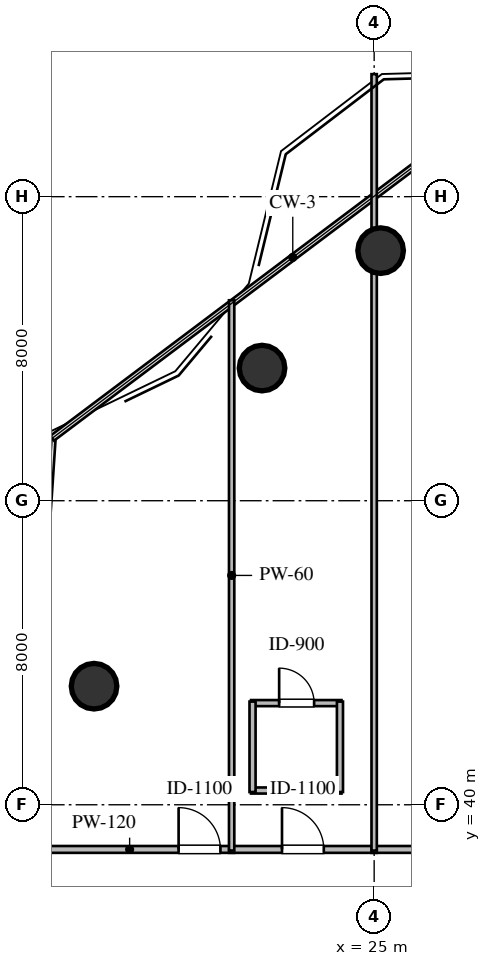
"""IFC4 building model, lengths in metres.
Left out: names, types, materials, properties, quantities, classifications, styles, units other than length and angle.
Written with IfcOpenShell. Run it as: python <this file> out.ifc"""

import sys

from ifc_helpers import new_model, si_unit, direction, frame, frame_2d, origin, origin_2d, place, context, subcontext, project, spatial, rectangle, circle, extrude, element, fill, save


model = new_model("IFC4")
c1 = context("Model", 3, precision=1e-05, world=origin(), true_north=direction((0.0, 1.0)))
c2 = subcontext(c1, "Body", "Model", "MODEL_VIEW")
j1 = project(units=[si_unit("LENGTHUNIT", "METRE"), si_unit("PLANEANGLEUNIT", "RADIAN")], contexts=[c1])
p1 = place(None, origin())
s1 = spatial("IfcSite", under=j1, at=p1, CompositionType="ELEMENT")
p2 = place(p1, origin())
s2 = spatial("IfcBuilding", under=s1, at=p2, CompositionType="ELEMENT")
p3 = place(p2, frame((0.0, 0.0, 124.2)))
s3 = spatial("IfcBuildingStorey", under=s2, at=p3, CompositionType="ELEMENT", Elevation=124.2)
for number, where, z_axis, x_axis in (
    (1, (25.17, 54.58, 0.0), (0.0, 0.0, 1.0), (1.0, 0.0, 0.0)),
    (2, (22.05, 51.49, 0.0), (0.0, 0.0, 1.0), (1.0, 0.0, 0.0)),
    (3, (17.63, 43.12, 0.0), (0.0, 0.0, 1.0), (1.0, 0.0, 0.0)),
):
    element("IfcColumn", number, at=place(p3, frame(where, z_axis=z_axis, x_axis=x_axis)), inside=s3, PredefinedType="COLUMN", context=c2, shape_type="SweptSolid", body=[
        extrude(circle(Radius=0.6, at=origin_2d()), origin(), (0.0, 0.0, 1.0), 3.6),
    ])
p4 = place(p3, frame((21.76, 40.375, 0.0), z_axis=(0.0, 0.0, 1.0), x_axis=(1.0, 0.0, 0.0)))
e4 = element("IfcWall", 4, at=p4, inside=s3, PredefinedType="PLUMBINGWALL", context=c2, shape_type="SweptSolid", body=[
    extrude(rectangle(XDim=2.38, YDim=0.16, at=frame_2d((1.19, 0.0))), origin(), (0.0, 0.0, 1.0), 3.36),
])
p5 = place(p3, frame((21.76, 42.675, 0.0), z_axis=(0.0, 0.0, 1.0), x_axis=(1.0, 0.0, 0.0)))
e5 = element("IfcWall", 5, at=p5, inside=s3, PredefinedType="PLUMBINGWALL", context=c2, shape_type="SweptSolid", body=[
    extrude(rectangle(XDim=2.38, YDim=0.16, at=frame_2d((1.19, 0.0))), origin(), (0.0, 0.0, 1.0), 3.36),
])
p6 = place(p5, frame((0.74, 0.0, 0.0)))
e6 = element("IfcOpeningElement", 6, at=p6, cuts=e5, PredefinedType="OPENING", context=c2, shape_type="SweptSolid", body=[
    extrude(rectangle(XDim=0.92, YDim=2.1, at=frame_2d((0.46, 1.05))), frame((0.0, 0.09, 0.0), z_axis=(0.0, -1.0, 0.0), x_axis=(1.0, 0.0, 0.0)), (0.0, 0.0, 1.0), 0.18),
])
p7 = place(p3, frame((21.8, 40.335, 0.0), z_axis=(0.0, 0.0, 1.0), x_axis=(0.0, 1.0, 0.0)))
e7 = element("IfcWall", 7, at=p7, inside=s3, PredefinedType="PLUMBINGWALL", context=c2, shape_type="SweptSolid", body=[
    extrude(rectangle(XDim=2.38, YDim=0.16, at=frame_2d((1.19, 0.0))), origin(), (0.0, 0.0, 1.0), 2.806),
])
p8 = place(p3, frame((24.1, 40.335, 0.0), z_axis=(0.0, 0.0, 1.0), x_axis=(0.0, 1.0, 0.0)))
e8 = element("IfcWall", 8, at=p8, inside=s3, PredefinedType="PLUMBINGWALL", context=c2, shape_type="SweptSolid", body=[
    extrude(rectangle(XDim=2.38, YDim=0.16, at=frame_2d((1.19, 0.0))), origin(), (0.0, 0.0, 1.0), 3.36),
])
p9 = place(p3, frame((15.817, 38.825, 0.0), z_axis=(0.0, 0.0, 1.0), x_axis=(1.0, 0.0, 0.0)))
e9 = element("IfcWall", 9, at=p9, inside=s3, PredefinedType="PARTITIONING", context=c2, shape_type="SweptSolid", body=[
    extrude(rectangle(XDim=5.498, YDim=0.18, at=frame_2d((2.749, 0.0))), origin(), (0.0, 0.0, 1.0), 3.36),
])
p10 = place(p9, frame((4.038, 0.0, 0.0)))
e10 = element("IfcOpeningElement", 10, at=p10, cuts=e9, PredefinedType="OPENING", context=c2, shape_type="SweptSolid", body=[
    extrude(rectangle(XDim=1.1, YDim=2.1, at=frame_2d((0.55, 1.05))), frame((0.0, 0.1, 0.0), z_axis=(0.0, -1.0, 0.0), x_axis=(1.0, 0.0, 0.0)), (0.0, 0.0, 1.0), 0.2),
])
p11 = place(p3, frame((21.185, 38.825, 0.0), z_axis=(0.0, 0.0, 1.0), x_axis=(1.0, 0.0, 0.0)))
e11 = element("IfcWall", 11, at=p11, inside=s3, PredefinedType="PARTITIONING", context=c2, shape_type="SweptSolid", body=[
    extrude(rectangle(XDim=3.88, YDim=0.18, at=frame_2d((1.94, 0.0))), origin(), (0.0, 0.0, 1.0), 3.36),
])
p12 = place(p11, frame((1.39, 0.0, 0.0)))
e12 = element("IfcOpeningElement", 12, at=p12, cuts=e11, PredefinedType="OPENING", context=c2, shape_type="SweptSolid", body=[
    extrude(rectangle(XDim=1.1, YDim=2.1, at=frame_2d((0.55, 1.05))), frame((0.0, 0.1, 0.0), z_axis=(0.0, -1.0, 0.0), x_axis=(1.0, 0.0, 0.0)), (0.0, 0.0, 1.0), 0.2),
])
p13 = place(p3, frame((24.935, 38.825, 0.0), z_axis=(0.0, 0.0, 1.0), x_axis=(1.0, 0.0, 0.0)))
e13 = element("IfcWall", 13, at=p13, inside=s3, PredefinedType="PARTITIONING", context=c2, shape_type="SweptSolid", body=[
    extrude(rectangle(XDim=3.88, YDim=0.18, at=frame_2d((1.94, 0.0))), origin(), (0.0, 0.0, 1.0), 3.36),
])
p14 = place(p13, frame((1.39, 0.0, 0.0)))
e14 = element("IfcOpeningElement", 14, at=p14, cuts=e13, PredefinedType="OPENING", context=c2, shape_type="SweptSolid", body=[
    extrude(rectangle(XDim=1.1, YDim=2.1, at=frame_2d((0.55, 1.05))), frame((0.0, 0.1, 0.0), z_axis=(0.0, -1.0, 0.0), x_axis=(1.0, 0.0, 0.0)), (0.0, 0.0, 1.0), 0.2),
])
p15 = place(p3, frame((21.25, 53.274, 0.0), z_axis=(0.0, 0.0, 1.0), x_axis=(0.0, -1.0, 0.0)))
e15 = element("IfcWall", 15, at=p15, inside=s3, PredefinedType="PARTITIONING", context=c2, shape_type="SweptSolid", body=[
    extrude(rectangle(XDim=14.479, YDim=0.14, at=frame_2d((7.24, 0.0))), origin(), (0.0, 0.0, 1.0), 3.36),
])
p16 = place(p3, frame((25.0, 59.224, 0.0), z_axis=(0.0, 0.0, 1.0), x_axis=(0.0, -1.0, 0.0)))
e16 = element("IfcWall", 16, at=p16, inside=s3, PredefinedType="PARTITIONING", context=c2, shape_type="SweptSolid", body=[
    extrude(rectangle(XDim=20.429, YDim=0.14, at=frame_2d((10.215, 0.0))), origin(), (0.0, 0.0, 1.0), 2.806),
])
p17 = place(p6, origin())
e17 = element("IfcDoor", 17, at=p17, inside=s3, OperationType="SINGLE_SWING_LEFT", PredefinedType="DOOR", context=c2, shape_type="SweptSolid", body=[
    extrude(rectangle(XDim=0.92, YDim=2.1, at=frame_2d((0.46, 1.05))), frame((0.0, 0.025, 0.0), z_axis=(0.0, -1.0, 0.0), x_axis=(1.0, 0.0, 0.0)), (0.0, 0.0, 1.0), 0.05),
])
fill(e6, e17)
p18 = place(p10, origin())
e18 = element("IfcDoor", 18, at=p18, inside=s3, OperationType="SINGLE_SWING_LEFT", PredefinedType="DOOR", context=c2, shape_type="SweptSolid", body=[
    extrude(rectangle(XDim=1.1, YDim=2.1, at=frame_2d((0.55, 1.05))), frame((0.0, 0.025, 0.0), z_axis=(0.0, -1.0, 0.0), x_axis=(1.0, 0.0, 0.0)), (0.0, 0.0, 1.0), 0.05),
])
fill(e10, e18)
p19 = place(p12, origin())
e19 = element("IfcDoor", 19, at=p19, inside=s3, OperationType="SINGLE_SWING_LEFT", PredefinedType="DOOR", context=c2, shape_type="SweptSolid", body=[
    extrude(rectangle(XDim=1.1, YDim=2.1, at=frame_2d((0.55, 1.05))), frame((0.0, 0.025, 0.0), z_axis=(0.0, -1.0, 0.0), x_axis=(1.0, 0.0, 0.0)), (0.0, 0.0, 1.0), 0.05),
])
fill(e12, e19)
save(model, sys.argv[1])
